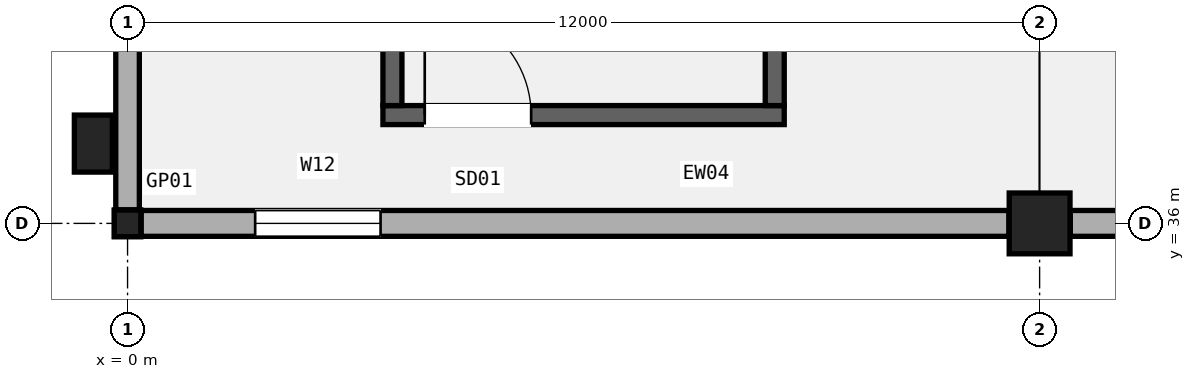
"""IFC4 building model, lengths in metres.
Left out: names, types, materials, properties, quantities, classifications, styles, units other than length and angle.
Written with IfcOpenShell. Run it as: python <this file> out.ifc"""

import sys

from ifc_helpers import new_model, si_unit, direction, frame, frame_2d, origin, origin_2d, place, context, subcontext, project, spatial, rectangle, hollow_rectangle, extrude, element, fill, save


model = new_model("IFC4")
c1 = context("Model", 3, precision=1e-05, world=origin(), true_north=direction((0.0, 1.0)))
c2 = subcontext(c1, "Body", "Model", "MODEL_VIEW")
j1 = project(units=[si_unit("LENGTHUNIT", "METRE"), si_unit("PLANEANGLEUNIT", "RADIAN")], contexts=[c1])
p1 = place(None, origin())
s1 = spatial("IfcSite", under=j1, at=p1, CompositionType="ELEMENT")
p2 = place(p1, origin())
s2 = spatial("IfcBuilding", under=s1, at=p2, CompositionType="ELEMENT")
p3 = place(p2, frame((0.0, 0.0, 15.3)))
s3 = spatial("IfcBuildingStorey", under=s2, at=p3, CompositionType="ELEMENT", Elevation=15.3)
p4 = place(p3, frame((0.0, 36.0, 0.0), z_axis=(0.0, 0.0, 1.0), x_axis=(1.0, 0.0, 0.0)))
e1 = element("IfcColumn", 1, at=p4, inside=s3, PredefinedType="COLUMN", context=c2, shape_type="SweptSolid", body=[
    extrude(hollow_rectangle(XDim=0.35, YDim=0.35, WallThickness=0.016, InnerFilletRadius=0.016, OuterFilletRadius=0.032, at=origin_2d()), origin(), (0.0, 0.0, 1.0), 5.1),
])
p5 = place(p3, frame((12.0, 36.0, 0.0), z_axis=(0.0, 0.0, 1.0), x_axis=(1.0, 0.0, 0.0)))
e2 = element("IfcColumn", 2, at=p5, inside=s3, PredefinedType="COLUMN", context=c2, shape_type="SweptSolid", body=[
    extrude(rectangle(XDim=0.8, YDim=0.8, at=origin_2d()), origin(), (0.0, 0.0, 1.0), 5.1),
])
p6 = place(p3, frame((-0.45, 37.05, 0.0), z_axis=(0.0, 0.0, 1.0), x_axis=(1.0, 0.0, 0.0)))
e3 = element("IfcColumn", 3, at=p6, inside=s3, PredefinedType="PILASTER", context=c2, shape_type="SweptSolid", body=[
    extrude(rectangle(XDim=0.5, YDim=0.75, at=origin_2d()), origin(), (0.0, 0.0, 1.0), 5.1),
])
p7 = place(p3, frame((0.179, 36.0, 0.0), z_axis=(0.0, 0.0, 1.0), x_axis=(1.0, 0.0, 0.0)))
e4 = element("IfcWall", 4, at=p7, inside=s3, PredefinedType="SOLIDWALL", context=c2, shape_type="SweptSolid", body=[
    extrude(rectangle(XDim=11.417, YDim=0.34, at=frame_2d((5.708, 0.0))), origin(), (0.0, 0.0, 1.0), 4.06),
])
p8 = place(p7, frame((1.5, 0.0, 0.95)))
e5 = element("IfcOpeningElement", 5, at=p8, cuts=e4, PredefinedType="OPENING", context=c2, shape_type="SweptSolid", body=[
    extrude(rectangle(XDim=1.65, YDim=2.45, at=frame_2d((0.825, 1.225))), frame((0.0, 0.18, 0.0), z_axis=(0.0, -1.0, 0.0), x_axis=(1.0, 0.0, 0.0)), (0.0, 0.0, 1.0), 0.36),
])
p9 = place(p3, frame((0.0, 36.179, 0.0), z_axis=(0.0, 0.0, 1.0), x_axis=(0.0, 1.0, 0.0)))
e6 = element("IfcWall", 6, at=p9, inside=s3, PredefinedType="SOLIDWALL", context=c2, shape_type="SweptSolid", body=[
    extrude(rectangle(XDim=11.417, YDim=0.31, at=frame_2d((5.708, 0.0))), origin(), (0.0, 0.0, 1.0), 4.06),
])
p10 = place(p9, frame((2.75, 0.0, 0.95)))
e7 = element("IfcOpeningElement", 7, at=p10, cuts=e6, PredefinedType="OPENING", context=c2, shape_type="SweptSolid", body=[
    extrude(rectangle(XDim=1.8, YDim=1.75, at=frame_2d((0.9, 0.875))), frame((0.0, 0.165, 0.0), z_axis=(0.0, -1.0, 0.0), x_axis=(1.0, 0.0, 0.0)), (0.0, 0.0, 1.0), 0.33),
])
p11 = place(p3, frame((12.404, 36.0, 0.0), z_axis=(0.0, 0.0, 1.0), x_axis=(1.0, 0.0, 0.0)))
e8 = element("IfcWall", 8, at=p11, inside=s3, PredefinedType="SOLIDWALL", context=c2, shape_type="SweptSolid", body=[
    extrude(rectangle(XDim=0.65, YDim=0.34, at=frame_2d((0.325, 0.0))), origin(), (0.0, 0.0, 1.0), 4.16),
])
p12 = place(p3, frame((3.36, 37.425, 0.0), z_axis=(0.0, 0.0, 1.0), x_axis=(1.0, 0.0, 0.0)))
e9 = element("IfcWall", 9, at=p12, inside=s3, PredefinedType="SHEAR", context=c2, shape_type="SweptSolid", body=[
    extrude(rectangle(XDim=5.28, YDim=0.25, at=frame_2d((2.64, 0.0))), origin(), (0.0, 0.0, 1.0), 4.86),
])
p13 = place(p12, frame((0.55, 0.0, 0.0)))
e10 = element("IfcOpeningElement", 10, at=p13, cuts=e9, PredefinedType="OPENING", context=c2, shape_type="SweptSolid", body=[
    extrude(rectangle(XDim=1.4, YDim=2.15, at=frame_2d((0.7, 1.075))), frame((0.0, 0.135, 0.0), z_axis=(0.0, -1.0, 0.0), x_axis=(1.0, 0.0, 0.0)), (0.0, 0.0, 1.0), 0.27),
])
for number, where, z_axis, x_axis in (
    (11, (3.485, 37.55, 0.0), (0.0, 0.0, 1.0), (0.0, 1.0, 0.0)),
    (12, (8.515, 37.55, 0.0), (0.0, 0.0, 1.0), (0.0, 1.0, 0.0)),
):
    element("IfcWall", number, at=place(p3, frame(where, z_axis=z_axis, x_axis=x_axis)), inside=s3, PredefinedType="SHEAR", context=c2, shape_type="SweptSolid", body=[
        extrude(rectangle(XDim=8.9, YDim=0.25, at=frame_2d((4.45, 0.0))), origin(), (0.0, 0.0, 1.0), 4.86),
    ])
p14 = place(p8, origin())
e13 = element("IfcWindow", 13, at=p14, inside=s3, PartitioningType="SINGLE_PANEL", PredefinedType="WINDOW", context=c2, shape_type="SweptSolid", body=[
    extrude(rectangle(XDim=1.65, YDim=2.45, at=frame_2d((0.825, 1.225))), frame((0.0, 0.03, 0.0), z_axis=(0.0, -1.0, 0.0), x_axis=(1.0, 0.0, 0.0)), (0.0, 0.0, 1.0), 0.06),
])
fill(e5, e13)
p15 = place(p13, origin())
e14 = element("IfcDoor", 14, at=p15, inside=s3, OperationType="SINGLE_SWING_LEFT", PredefinedType="DOOR", context=c2, shape_type="SweptSolid", body=[
    extrude(rectangle(XDim=1.4, YDim=2.15, at=frame_2d((0.7, 1.075))), frame((0.0, 0.025, 0.0), z_axis=(0.0, -1.0, 0.0), x_axis=(1.0, 0.0, 0.0)), (0.0, 0.0, 1.0), 0.05),
])
fill(e10, e14)
save(model, sys.argv[1])
